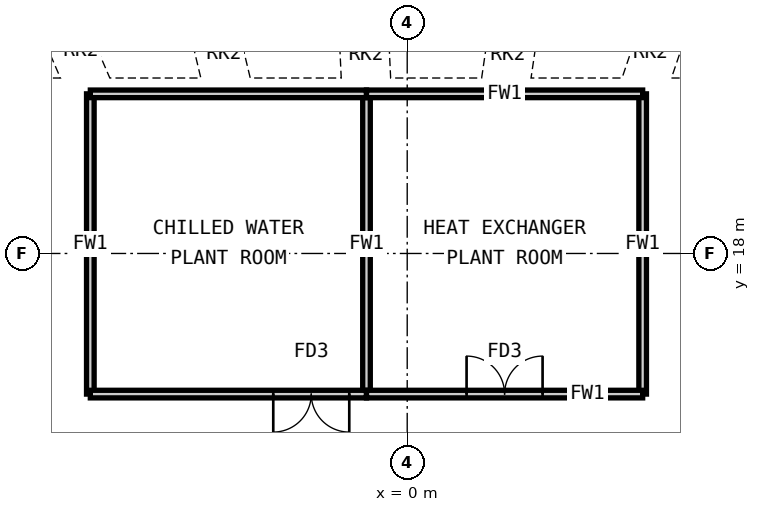
"""IFC4 building model, lengths in metres.
Left out: names, types, materials, properties, quantities, classifications, styles, units other than length and angle.
Written with IfcOpenShell. Run it as: python <this file> out.ifc"""

import sys

from ifc_helpers import new_model, si_unit, direction, frame, frame_2d, origin, origin_2d, place, context, subcontext, project, spatial, rectangle, hollow_rectangle, extrude, clip, halfspace, element, fill, save


model = new_model("IFC4")
c1 = context("Model", 3, precision=1e-05, world=origin(), true_north=direction((0.0, 1.0)))
c2 = subcontext(c1, "Body", "Model", "MODEL_VIEW")
j1 = project(units=[si_unit("LENGTHUNIT", "METRE"), si_unit("PLANEANGLEUNIT", "RADIAN")], contexts=[c1])
p1 = place(None, origin())
s1 = spatial("IfcSite", under=j1, at=p1, CompositionType="ELEMENT")
p2 = place(p1, origin())
s2 = spatial("IfcBuilding", under=s1, at=p2, CompositionType="ELEMENT")
p3 = place(p2, frame((0.0, 0.0, 174.4)))
s3 = spatial("IfcBuildingStorey", under=s2, at=p3, CompositionType="ELEMENT", Elevation=174.4)
p4 = place(p3, frame((-9.203, 25.0, 0.0), z_axis=(0.13539287358, -0.313315937958, 0.939947813873), x_axis=(-0.917958510973, -0.39667640733, 0.0)))
e1 = element("IfcColumn", 1, at=p4, inside=s3, PredefinedType="COLUMN", context=c2, shape_type="Clipping", body=[
    clip(clip(extrude(hollow_rectangle(XDim=1.3, YDim=1.3, WallThickness=0.1, at=origin_2d()), origin(), (0.0, 0.0, 1.0), 6.383), halfspace(frame((0.0, 0.0, 0.236), z_axis=(0.0, 0.0, -1.0), x_axis=(0.0, -1.0, 0.0)), False)), halfspace(frame((0.0, 0.0, 6.148), z_axis=(0.0, 0.0, 1.0), x_axis=(0.0, 1.0, 0.0)), False)),
])
p5 = place(p3, frame((-5.184, 25.0, 0.0), z_axis=(0.075482606541, -0.315325605701, 0.945976817104), x_axis=(-0.972523990796, -0.232802678949, 0.0)))
e2 = element("IfcColumn", 2, at=p5, inside=s3, PredefinedType="COLUMN", context=c2, shape_type="Clipping", body=[
    clip(clip(extrude(hollow_rectangle(XDim=1.3, YDim=1.3, WallThickness=0.1, at=origin_2d()), origin(), (0.0, 0.0, 1.0), 6.343), halfspace(frame((0.0, 0.0, 0.222), z_axis=(0.0, 0.0, -1.0), x_axis=(0.0, -1.0, 0.0)), False)), halfspace(frame((0.0, 0.0, 6.12), z_axis=(0.0, 0.0, 1.0), x_axis=(0.0, 1.0, 0.0)), False)),
])
p6 = place(p3, frame((-1.165, 25.0, 0.0), z_axis=(0.01474436954, -0.316193390754, 0.948580172263), x_axis=(-0.998914551336, -0.046580243971, 0.0)))
e3 = element("IfcColumn", 3, at=p6, inside=s3, PredefinedType="COLUMN", context=c2, shape_type="Clipping", body=[
    clip(clip(extrude(hollow_rectangle(XDim=1.3, YDim=1.3, WallThickness=0.1, at=origin_2d()), origin(), (0.0, 0.0, 1.0), 6.325), halfspace(frame((0.0, 0.0, 0.215), z_axis=(0.0, 0.0, -1.0), x_axis=(0.0, -1.0, 0.0)), False)), halfspace(frame((0.0, 0.0, 6.111), z_axis=(0.0, 0.0, 1.0), x_axis=(0.0, 1.0, 0.0)), False)),
])
p7 = place(p3, frame((2.854, 25.0, 0.0), z_axis=(-0.046157372678, -0.315890724294, 0.947672172881), x_axis=(-0.989492697131, 0.144582856258, 0.0)))
e4 = element("IfcColumn", 4, at=p7, inside=s3, PredefinedType="COLUMN", context=c2, shape_type="Clipping", body=[
    clip(clip(extrude(hollow_rectangle(XDim=1.3, YDim=1.3, WallThickness=0.1, at=origin_2d()), origin(), (0.0, 0.0, 1.0), 6.331), halfspace(frame((0.0, 0.0, 0.219), z_axis=(0.0, 0.0, -1.0), x_axis=(0.0, -1.0, 0.0)), False)), halfspace(frame((0.0, 0.0, 6.113), z_axis=(0.0, 0.0, 1.0), x_axis=(0.0, 1.0, 0.0)), False)),
])
p8 = place(p3, frame((6.874, 25.0, 0.0), z_axis=(-0.106587148769, -0.31442633155, 0.943278994649), x_axis=(-0.947064092103, 0.321044553683, 0.0)))
e5 = element("IfcColumn", 5, at=p8, inside=s3, PredefinedType="COLUMN", context=c2, shape_type="Clipping", body=[
    clip(clip(extrude(hollow_rectangle(XDim=1.3, YDim=1.3, WallThickness=0.1, at=origin_2d()), origin(), (0.0, 0.0, 1.0), 6.361), halfspace(frame((0.0, 0.0, 0.229), z_axis=(0.0, 0.0, -1.0), x_axis=(0.0, -1.0, 0.0)), False)), halfspace(frame((0.0, 0.0, 6.132), z_axis=(0.0, 0.0, 1.0), x_axis=(0.0, 1.0, 0.0)), False)),
])
p9 = place(p3, frame((-8.338, 22.2, 0.0), z_axis=(0.0, 0.0, 1.0), x_axis=(0.0, -1.0, 0.0)))
e6 = element("IfcWall", 6, at=p9, inside=s3, PredefinedType="PARTITIONING", context=c2, shape_type="SweptSolid", body=[
    extrude(rectangle(XDim=7.9, YDim=0.2, at=frame_2d((3.95, 0.0))), origin(), (0.0, 0.0, 1.0), 5.83),
])
p10 = place(p3, frame((-1.071, 22.2, 0.0), z_axis=(0.0, 0.0, 1.0), x_axis=(0.0, -1.0, 0.0)))
e7 = element("IfcWall", 7, at=p10, inside=s3, PredefinedType="PARTITIONING", context=c2, shape_type="SweptSolid", body=[
    extrude(rectangle(XDim=7.9, YDim=0.2, at=frame_2d((3.95, 0.0))), origin(), (0.0, 0.0, 1.0), 4.63),
])
p11 = place(p3, frame((-8.338, 14.3, 0.0), z_axis=(0.0, 0.0, 1.0), x_axis=(1.0, 0.0, 0.0)))
e8 = element("IfcWall", 8, at=p11, inside=s3, PredefinedType="PARTITIONING", context=c2, shape_type="SweptSolid", body=[
    extrude(rectangle(XDim=7.267, YDim=0.2, at=frame_2d((3.634, 0.0))), origin(), (0.0, 0.0, 1.0), 5.83),
])
p12 = place(p11, frame((4.814, 0.0, 0.0)))
e9 = element("IfcOpeningElement", 9, at=p12, cuts=e8, PredefinedType="OPENING", context=c2, shape_type="SweptSolid", body=[
    extrude(rectangle(XDim=2.0, YDim=2.4, at=frame_2d((1.0, 1.2))), frame((0.0, 0.11, 0.0), z_axis=(0.0, -1.0, 0.0), x_axis=(1.0, 0.0, 0.0)), (0.0, 0.0, 1.0), 0.22),
])
p13 = place(p3, frame((6.196, 22.2, 0.0), z_axis=(0.0, 0.0, 1.0), x_axis=(0.0, -1.0, 0.0)))
e10 = element("IfcWall", 10, at=p13, inside=s3, PredefinedType="PARTITIONING", context=c2, shape_type="SweptSolid", body=[
    extrude(rectangle(XDim=7.9, YDim=0.2, at=frame_2d((3.95, 0.0))), origin(), (0.0, 0.0, 1.0), 5.83),
])
p14 = place(p3, frame((-1.071, 14.3, 0.0), z_axis=(0.0, 0.0, 1.0), x_axis=(1.0, 0.0, 0.0)))
e11 = element("IfcWall", 11, at=p14, inside=s3, PredefinedType="PARTITIONING", context=c2, shape_type="SweptSolid", body=[
    extrude(rectangle(XDim=7.267, YDim=0.2, at=frame_2d((3.634, 0.0))), origin(), (0.0, 0.0, 1.0), 5.83),
])
p15 = place(p14, frame((2.634, 0.0, 0.0)))
e12 = element("IfcOpeningElement", 12, at=p15, cuts=e11, PredefinedType="OPENING", context=c2, shape_type="SweptSolid", body=[
    extrude(rectangle(XDim=2.0, YDim=2.4, at=frame_2d((1.0, 1.2))), frame((0.0, 0.11, 0.0), z_axis=(0.0, -1.0, 0.0), x_axis=(1.0, 0.0, 0.0)), (0.0, 0.0, 1.0), 0.22),
])
for number, where, z_axis, x_axis in (
    (13, (-8.338, 22.2, 0.0), (0.0, 0.0, 1.0), (1.0, 0.0, 0.0)),
    (14, (-1.071, 22.2, 0.0), (0.0, 0.0, 1.0), (1.0, 0.0, 0.0)),
):
    element("IfcWall", number, at=place(p3, frame(where, z_axis=z_axis, x_axis=x_axis)), inside=s3, PredefinedType="PARTITIONING", context=c2, shape_type="SweptSolid", body=[
        extrude(rectangle(XDim=7.267, YDim=0.2, at=frame_2d((3.634, 0.0))), origin(), (0.0, 0.0, 1.0), 5.83),
    ])
p16 = place(p12, origin())
e15 = element("IfcDoor", 15, at=p16, inside=s3, OperationType="DOUBLE_DOOR_DOUBLE_SWING", PredefinedType="DOOR", context=c2, shape_type="SweptSolid", body=[
    extrude(rectangle(XDim=2.0, YDim=2.4, at=frame_2d((1.0, 1.2))), frame((0.0, 0.025, 0.0), z_axis=(0.0, -1.0, 0.0), x_axis=(1.0, 0.0, 0.0)), (0.0, 0.0, 1.0), 0.05),
])
fill(e9, e15)
p17 = place(p15, origin())
e16 = element("IfcDoor", 16, at=p17, inside=s3, OperationType="DOUBLE_DOOR_DOUBLE_SWING", PredefinedType="DOOR", context=c2, shape_type="SweptSolid", body=[
    extrude(rectangle(XDim=2.0, YDim=2.4, at=frame_2d((1.0, 1.2))), frame((0.0, 0.025, 0.0), z_axis=(0.0, -1.0, 0.0), x_axis=(1.0, 0.0, 0.0)), (0.0, 0.0, 1.0), 0.05),
])
fill(e12, e16)
save(model, sys.argv[1])
